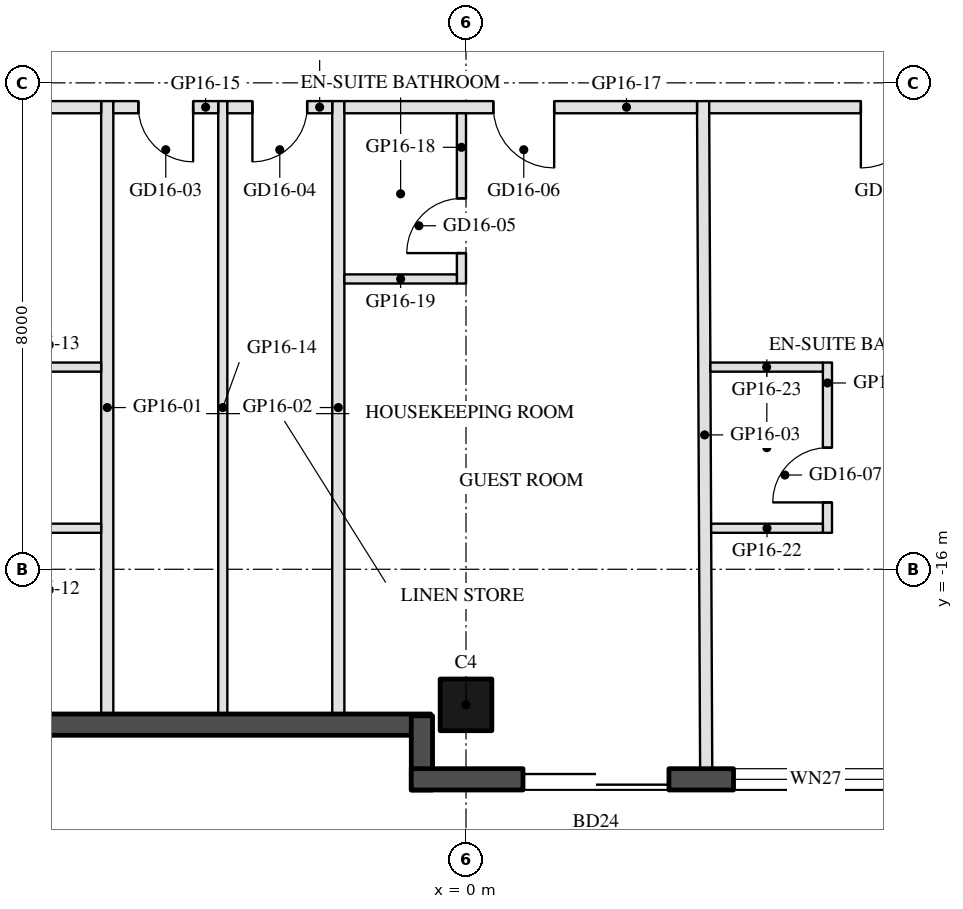
"""IFC4 building model, lengths in metres.
Left out: names, types, materials, properties, quantities, classifications, styles, units other than length and angle.
Written with IfcOpenShell. Run it as: python <this file> out.ifc"""

import sys

from ifc_helpers import new_model, si_unit, direction, frame, frame_2d, origin, origin_2d, place, context, subcontext, project, spatial, rectangle, hollow_rectangle, extrude, element, fill, save


model = new_model("IFC4")
c1 = context("Model", 3, precision=1e-05, world=origin(), true_north=direction((0.0, 1.0)))
c2 = subcontext(c1, "Body", "Model", "MODEL_VIEW")
j1 = project(units=[si_unit("LENGTHUNIT", "METRE"), si_unit("PLANEANGLEUNIT", "RADIAN")], contexts=[c1])
p1 = place(None, origin())
s1 = spatial("IfcSite", under=j1, at=p1, CompositionType="ELEMENT")
p2 = place(p1, origin())
s2 = spatial("IfcBuilding", under=s1, at=p2, CompositionType="ELEMENT")
p3 = place(p2, frame((0.0, 0.0, 176.2)))
s3 = spatial("IfcBuildingStorey", under=s2, at=p3, CompositionType="ELEMENT", Elevation=176.2)
p4 = place(p3, frame((0.0, -18.23, 0.0), z_axis=(0.0, 0.0, 1.0), x_axis=(-1.0, 0.0, 0.0)))
e1 = element("IfcColumn", 1, at=p4, inside=s3, PredefinedType="COLUMN", context=c2, shape_type="SweptSolid", body=[
    extrude(hollow_rectangle(XDim=0.85, YDim=0.85, WallThickness=0.04, at=origin_2d()), origin(), (0.0, 0.0, 1.0), 3.7),
])
p5 = place(p3, frame((-7.32, -18.555, 0.0), z_axis=(0.0, 0.0, 1.0), x_axis=(1.0, 0.0, 0.0)))
e2 = element("IfcWall", 2, at=p5, inside=s3, PredefinedType="SOLIDWALL", context=c2, shape_type="SweptSolid", body=[
    extrude(rectangle(XDim=6.74, YDim=0.35, at=frame_2d((3.37, 0.0))), origin(), (0.0, 0.0, 1.0), 3.55),
])
p6 = place(p3, frame((-0.725, -18.41, 0.0), z_axis=(0.0, 0.0, 1.0), x_axis=(0.0, -1.0, 0.0)))
e3 = element("IfcWall", 3, at=p6, inside=s3, PredefinedType="SOLIDWALL", context=c2, shape_type="SweptSolid", body=[
    extrude(rectangle(XDim=1.22, YDim=0.35, at=frame_2d((0.61, 0.0))), origin(), (0.0, 0.0, 1.0), 3.55),
])
p7 = place(p3, frame((-0.9, -19.455, 0.0), z_axis=(0.0, 0.0, 1.0), x_axis=(1.0, 0.0, 0.0)))
e4 = element("IfcWall", 4, at=p7, inside=s3, PredefinedType="SOLIDWALL", context=c2, shape_type="SweptSolid", body=[
    extrude(rectangle(XDim=9.7, YDim=0.35, at=frame_2d((4.85, 0.0))), origin(), (0.0, 0.0, 1.0), 3.55),
])
p8 = place(p7, frame((1.837, 0.0, 0.0)))
e5 = element("IfcOpeningElement", 5, at=p8, cuts=e4, PredefinedType="OPENING", context=c2, shape_type="SweptSolid", body=[
    extrude(rectangle(XDim=2.4, YDim=2.4, at=frame_2d((1.2, 1.2))), frame((0.0, 0.185, 0.0), z_axis=(0.0, -1.0, 0.0), x_axis=(1.0, 0.0, 0.0)), (0.0, 0.0, 1.0), 0.37),
])
p9 = place(p7, frame((5.3, 0.0, 0.3)))
e6 = element("IfcOpeningElement", 6, at=p9, cuts=e4, PredefinedType="OPENING", context=c2, shape_type="SweptSolid", body=[
    extrude(rectangle(XDim=2.7, YDim=2.65, at=frame_2d((1.35, 1.325))), frame((0.0, 0.185, 0.0), z_axis=(0.0, -1.0, 0.0), x_axis=(1.0, 0.0, 0.0)), (0.0, 0.0, 1.0), 0.37),
])
for number, where, z_axis, x_axis in (
    (7, (-5.9, -18.38, 0.0), (0.0, 0.0, 1.0), (0.0, 1.0, 0.0)),
    (8, (-2.1, -18.38, 0.0), (0.0, 0.0, 1.0), (0.0, 1.0, 0.0)),
):
    element("IfcWall", number, at=place(p3, frame(where, z_axis=z_axis, x_axis=x_axis)), inside=s3, PredefinedType="PARTITIONING", context=c2, shape_type="SweptSolid", body=[
        extrude(rectangle(XDim=10.08, YDim=0.2, at=frame_2d((5.04, 0.0))), origin(), (0.0, 0.0, 1.0), 3.06),
    ])
p10 = place(p3, frame((3.95, -19.28, 0.0), z_axis=(0.0, 0.0, 1.0), x_axis=(-0.004624844922, 0.999989305348, 0.0)))
e9 = element("IfcWall", 9, at=p10, inside=s3, PredefinedType="PARTITIONING", context=c2, shape_type="SweptSolid", body=[
    extrude(rectangle(XDim=10.98, YDim=0.2, at=frame_2d((5.49, 0.0))), origin(), (0.0, 0.0, 1.0), 2.95),
])
p11 = place(p3, frame((-6.0, -8.4, 0.0), z_axis=(0.0, 0.0, 1.0), x_axis=(-1.0, 0.0, 0.0)))
e10 = element("IfcWall", 10, at=p11, inside=s3, PredefinedType="PARTITIONING", context=c2, shape_type="SweptSolid", body=[
    extrude(rectangle(XDim=3.988, YDim=0.2, at=frame_2d((1.994, 0.0))), origin(), (0.0, 0.0, 1.0), 2.95),
])
p12 = place(p11, frame((1.494, 0.0, 0.0)))
e11 = element("IfcOpeningElement", 11, at=p12, cuts=e10, PredefinedType="OPENING", context=c2, shape_type="SweptSolid", body=[
    extrude(rectangle(XDim=1.0, YDim=2.1, at=frame_2d((0.5, 1.05))), frame((0.0, 0.11, 0.0), z_axis=(0.0, -1.0, 0.0), x_axis=(1.0, 0.0, 0.0)), (0.0, 0.0, 1.0), 0.22),
])
for number, where, z_axis, x_axis in (
    (12, (-7.85, -15.325, 0.0), (0.0, 0.0, 1.0), (1.0, 0.0, 0.0)),
    (13, (-7.85, -12.675, 0.0), (0.0, 0.0, 1.0), (1.0, 0.0, 0.0)),
):
    element("IfcWall", number, at=place(p3, frame(where, z_axis=z_axis, x_axis=x_axis)), inside=s3, PredefinedType="PARTITIONING", context=c2, shape_type="SweptSolid", body=[
        extrude(rectangle(XDim=1.85, YDim=0.15, at=frame_2d((0.925, 0.0))), origin(), (0.0, 0.0, 1.0), 2.95),
    ])
p13 = place(p3, frame((-4.0, -18.38, 0.0), z_axis=(0.0, 0.0, 1.0), x_axis=(0.0, 1.0, 0.0)))
e14 = element("IfcWall", 14, at=p13, inside=s3, PredefinedType="PARTITIONING", context=c2, shape_type="SweptSolid", body=[
    extrude(rectangle(XDim=10.08, YDim=0.15, at=frame_2d((5.04, 0.0))), origin(), (0.0, 0.0, 1.0), 2.95),
])
p14 = place(p3, frame((-4.075, -8.4, 0.0), z_axis=(0.0, 0.0, 1.0), x_axis=(-1.0, 0.0, 0.0)))
e15 = element("IfcWall", 15, at=p14, inside=s3, PredefinedType="PARTITIONING", context=c2, shape_type="SweptSolid", body=[
    extrude(rectangle(XDim=1.725, YDim=0.2, at=frame_2d((0.863, 0.0))), origin(), (0.0, 0.0, 1.0), 3.55),
])
p15 = place(p14, frame((0.413, 0.0, 0.0)))
e16 = element("IfcOpeningElement", 16, at=p15, cuts=e15, PredefinedType="OPENING", context=c2, shape_type="SweptSolid", body=[
    extrude(rectangle(XDim=0.9, YDim=2.1, at=frame_2d((0.45, 1.05))), frame((0.0, 0.11, 0.0), z_axis=(0.0, -1.0, 0.0), x_axis=(1.0, 0.0, 0.0)), (0.0, 0.0, 1.0), 0.22),
])
p16 = place(p3, frame((-2.2, -8.4, 0.0), z_axis=(0.0, 0.0, 1.0), x_axis=(-1.0, 0.0, 0.0)))
e17 = element("IfcWall", 17, at=p16, inside=s3, PredefinedType="PARTITIONING", context=c2, shape_type="SweptSolid", body=[
    extrude(rectangle(XDim=1.725, YDim=0.2, at=frame_2d((0.863, 0.0))), origin(), (0.0, 0.0, 1.0), 2.95),
])
p17 = place(p16, frame((0.413, 0.0, 0.0)))
e18 = element("IfcOpeningElement", 18, at=p17, cuts=e17, PredefinedType="OPENING", context=c2, shape_type="SweptSolid", body=[
    extrude(rectangle(XDim=0.9, YDim=2.1, at=frame_2d((0.45, 1.05))), frame((0.0, 0.11, 0.0), z_axis=(0.0, -1.0, 0.0), x_axis=(1.0, 0.0, 0.0)), (0.0, 0.0, 1.0), 0.22),
])
p18 = place(p3, frame((3.8, -8.4, 0.0), z_axis=(0.0, 0.0, 1.0), x_axis=(-1.0, 0.0, 0.0)))
e19 = element("IfcWall", 19, at=p18, inside=s3, PredefinedType="PARTITIONING", context=c2, shape_type="SweptSolid", body=[
    extrude(rectangle(XDim=5.8, YDim=0.2, at=frame_2d((2.9, 0.0))), origin(), (0.0, 0.0, 1.0), 2.95),
])
p19 = place(p18, frame((2.35, 0.0, 0.0)))
e20 = element("IfcOpeningElement", 20, at=p19, cuts=e19, PredefinedType="OPENING", context=c2, shape_type="SweptSolid", body=[
    extrude(rectangle(XDim=1.0, YDim=2.1, at=frame_2d((0.5, 1.05))), frame((0.0, 0.11, 0.0), z_axis=(0.0, -1.0, 0.0), x_axis=(1.0, 0.0, 0.0)), (0.0, 0.0, 1.0), 0.22),
])
p20 = place(p3, frame((-0.075, -11.3, 0.0), z_axis=(0.0, 0.0, 1.0), x_axis=(0.0, 1.0, 0.0)))
e21 = element("IfcWall", 21, at=p20, inside=s3, PredefinedType="PARTITIONING", context=c2, shape_type="SweptSolid", body=[
    extrude(rectangle(XDim=2.8, YDim=0.15, at=frame_2d((1.4, 0.0))), origin(), (0.0, 0.0, 1.0), 2.95),
])
p21 = place(p20, frame((0.5, 0.0, 0.0)))
e22 = element("IfcOpeningElement", 22, at=p21, cuts=e21, PredefinedType="OPENING", context=c2, shape_type="SweptSolid", body=[
    extrude(rectangle(XDim=0.9, YDim=2.1, at=frame_2d((0.45, 1.05))), frame((0.0, 0.085, 0.0), z_axis=(0.0, -1.0, 0.0), x_axis=(1.0, 0.0, 0.0)), (0.0, 0.0, 1.0), 0.17),
])
p22 = place(p3, frame((-2.0, -11.225, 0.0), z_axis=(0.0, 0.0, 1.0), x_axis=(1.0, 0.0, 0.0)))
e23 = element("IfcWall", 23, at=p22, inside=s3, PredefinedType="PARTITIONING", context=c2, shape_type="SweptSolid", body=[
    extrude(rectangle(XDim=1.85, YDim=0.15, at=frame_2d((0.925, 0.0))), origin(), (0.0, 0.0, 1.0), 3.55),
])
p23 = place(p3, frame((9.988, -8.4, 0.0), z_axis=(0.0, 0.0, 1.0), x_axis=(-1.0, 0.0, 0.0)))
e24 = element("IfcWall", 24, at=p23, inside=s3, PredefinedType="PARTITIONING", context=c2, shape_type="SweptSolid", body=[
    extrude(rectangle(XDim=5.989, YDim=0.2, at=frame_2d((2.994, 0.0))), origin(), (0.0, 0.0, 1.0), 2.95),
])
p24 = place(p23, frame((2.494, 0.0, 0.0)))
e25 = element("IfcOpeningElement", 25, at=p24, cuts=e24, PredefinedType="OPENING", context=c2, shape_type="SweptSolid", body=[
    extrude(rectangle(XDim=1.0, YDim=2.1, at=frame_2d((0.5, 1.05))), frame((0.0, 0.11, 0.0), z_axis=(0.0, -1.0, 0.0), x_axis=(1.0, 0.0, 0.0)), (0.0, 0.0, 1.0), 0.22),
])
p25 = place(p3, frame((5.944, -15.4, 0.0), z_axis=(0.0, 0.0, 1.0), x_axis=(0.0, 1.0, 0.0)))
e26 = element("IfcWall", 26, at=p25, inside=s3, PredefinedType="PARTITIONING", context=c2, shape_type="SweptSolid", body=[
    extrude(rectangle(XDim=2.8, YDim=0.15, at=frame_2d((1.4, 0.0))), origin(), (0.0, 0.0, 1.0), 3.55),
])
p26 = place(p25, frame((0.5, 0.0, 0.0)))
e27 = element("IfcOpeningElement", 27, at=p26, cuts=e26, PredefinedType="OPENING", context=c2, shape_type="SweptSolid", body=[
    extrude(rectangle(XDim=0.9, YDim=2.1, at=frame_2d((0.45, 1.05))), frame((0.0, 0.085, 0.0), z_axis=(0.0, -1.0, 0.0), x_axis=(1.0, 0.0, 0.0)), (0.0, 0.0, 1.0), 0.17),
])
p27 = place(p3, frame((4.032, -15.325, 0.0), z_axis=(0.0, 0.0, 1.0), x_axis=(1.0, 0.0, 0.0)))
e28 = element("IfcWall", 28, at=p27, inside=s3, PredefinedType="PARTITIONING", context=c2, shape_type="SweptSolid", body=[
    extrude(rectangle(XDim=1.837, YDim=0.15, at=frame_2d((0.918, 0.0))), origin(), (0.0, 0.0, 1.0), 2.95),
])
p28 = place(p3, frame((4.019, -12.675, 0.0), z_axis=(0.0, 0.0, 1.0), x_axis=(1.0, 0.0, 0.0)))
e29 = element("IfcWall", 29, at=p28, inside=s3, PredefinedType="PARTITIONING", context=c2, shape_type="SweptSolid", body=[
    extrude(rectangle(XDim=1.85, YDim=0.15, at=frame_2d((0.925, 0.0))), origin(), (0.0, 0.0, 1.0), 2.95),
])
p29 = place(p8, frame((2.4, 0.0, 0.0), z_axis=(0.0, 0.0, 1.0), x_axis=(-1.0, 0.0, 0.0)))
e30 = element("IfcDoor", 30, at=p29, inside=s3, OperationType="SLIDING_TO_LEFT", PredefinedType="DOOR", context=c2, shape_type="SweptSolid", body=[
    extrude(rectangle(XDim=2.4, YDim=2.4, at=frame_2d((1.2, 1.2))), frame((0.0, 0.025, 0.0), z_axis=(0.0, -1.0, 0.0), x_axis=(1.0, 0.0, 0.0)), (0.0, 0.0, 1.0), 0.05),
])
fill(e5, e30)
p30 = place(p9, origin())
e31 = element("IfcWindow", 31, at=p30, inside=s3, PartitioningType="SINGLE_PANEL", PredefinedType="WINDOW", context=c2, shape_type="SweptSolid", body=[
    extrude(rectangle(XDim=2.7, YDim=2.65, at=frame_2d((1.35, 1.325))), frame((0.0, 0.03, 0.0), z_axis=(0.0, -1.0, 0.0), x_axis=(1.0, 0.0, 0.0)), (0.0, 0.0, 1.0), 0.06),
])
fill(e6, e31)
p31 = place(p15, origin())
e32 = element("IfcDoor", 32, at=p31, inside=s3, OperationType="SINGLE_SWING_LEFT", PredefinedType="DOOR", context=c2, shape_type="SweptSolid", body=[
    extrude(rectangle(XDim=0.9, YDim=2.1, at=frame_2d((0.45, 1.05))), frame((0.0, 0.025, 0.0), z_axis=(0.0, -1.0, 0.0), x_axis=(1.0, 0.0, 0.0)), (0.0, 0.0, 1.0), 0.05),
])
fill(e16, e32)
p32 = place(p17, origin())
e33 = element("IfcDoor", 33, at=p32, inside=s3, OperationType="SINGLE_SWING_RIGHT", PredefinedType="DOOR", context=c2, shape_type="SweptSolid", body=[
    extrude(rectangle(XDim=0.9, YDim=2.1, at=frame_2d((0.45, 1.05))), frame((0.0, 0.025, 0.0), z_axis=(0.0, -1.0, 0.0), x_axis=(1.0, 0.0, 0.0)), (0.0, 0.0, 1.0), 0.05),
])
fill(e18, e33)
p33 = place(p21, origin())
e34 = element("IfcDoor", 34, at=p33, inside=s3, OperationType="SINGLE_SWING_LEFT", PredefinedType="DOOR", context=c2, shape_type="SweptSolid", body=[
    extrude(rectangle(XDim=0.9, YDim=2.1, at=frame_2d((0.45, 1.05))), frame((0.0, 0.025, 0.0), z_axis=(0.0, -1.0, 0.0), x_axis=(1.0, 0.0, 0.0)), (0.0, 0.0, 1.0), 0.05),
])
fill(e22, e34)
p34 = place(p19, origin())
e35 = element("IfcDoor", 35, at=p34, inside=s3, OperationType="SINGLE_SWING_LEFT", PredefinedType="DOOR", context=c2, shape_type="SweptSolid", body=[
    extrude(rectangle(XDim=1.0, YDim=2.1, at=frame_2d((0.5, 1.05))), frame((0.0, 0.025, 0.0), z_axis=(0.0, -1.0, 0.0), x_axis=(1.0, 0.0, 0.0)), (0.0, 0.0, 1.0), 0.05),
])
fill(e20, e35)
p35 = place(p26, origin())
e36 = element("IfcDoor", 36, at=p35, inside=s3, OperationType="SINGLE_SWING_LEFT", PredefinedType="DOOR", context=c2, shape_type="SweptSolid", body=[
    extrude(rectangle(XDim=0.9, YDim=2.1, at=frame_2d((0.45, 1.05))), frame((0.0, 0.025, 0.0), z_axis=(0.0, -1.0, 0.0), x_axis=(1.0, 0.0, 0.0)), (0.0, 0.0, 1.0), 0.05),
])
fill(e27, e36)
p36 = place(p24, origin())
e37 = element("IfcDoor", 37, at=p36, inside=s3, OperationType="SINGLE_SWING_RIGHT", PredefinedType="DOOR", context=c2, shape_type="SweptSolid", body=[
    extrude(rectangle(XDim=1.0, YDim=2.1, at=frame_2d((0.5, 1.05))), frame((0.0, 0.025, 0.0), z_axis=(0.0, -1.0, 0.0), x_axis=(1.0, 0.0, 0.0)), (0.0, 0.0, 1.0), 0.05),
])
fill(e25, e37)
save(model, sys.argv[1])
